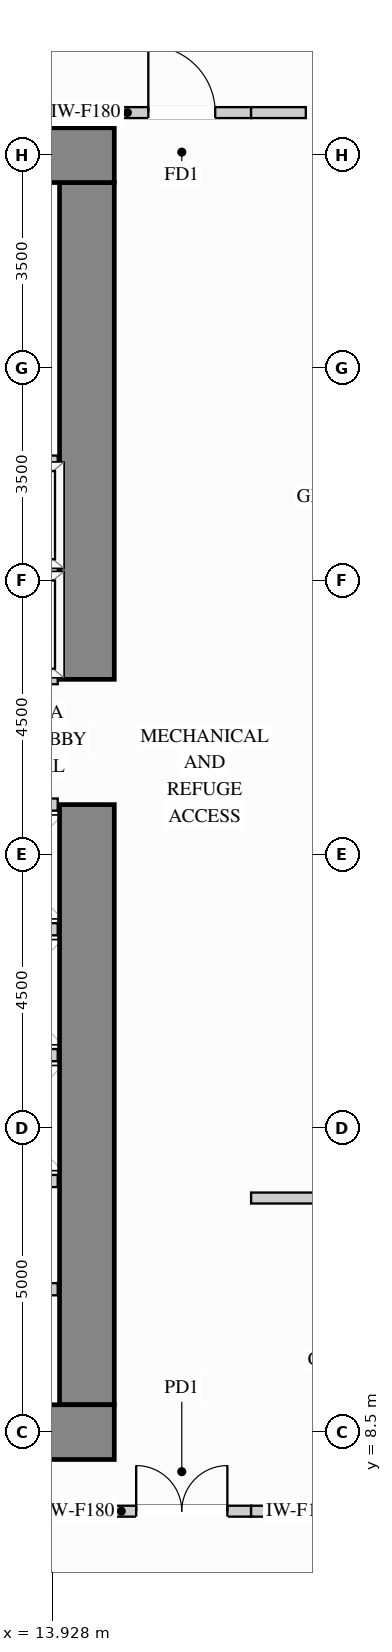
"""IFC4 building model, lengths in metres.
Left out: names, types, materials, properties, quantities, classifications, styles, units other than length and angle.
Written with IfcOpenShell. Run it as: python <this file> out.ifc"""

import sys

from ifc_helpers import new_model, si_unit, direction, frame, frame_2d, origin, place, context, subcontext, project, spatial, rectangle, extrude, source, transform, mapped, element, fill, save


model = new_model("IFC4")
c1 = context("Model", 3, precision=1e-05, world=origin(), true_north=direction((0.0, 1.0)))
c2 = subcontext(c1, "Body", "Model", "MODEL_VIEW")
j1 = project(units=[si_unit("LENGTHUNIT", "METRE"), si_unit("PLANEANGLEUNIT", "RADIAN")], contexts=[c1])
p1 = place(None, origin())
s1 = spatial("IfcSite", under=j1, at=p1, CompositionType="ELEMENT")
p2 = place(p1, origin())
s2 = spatial("IfcBuilding", under=s1, at=p2, CompositionType="ELEMENT")
p3 = place(p2, frame((0.0, 0.0, 72.9)))
s3 = spatial("IfcBuildingStorey", under=s2, at=p3, CompositionType="ELEMENT", Elevation=72.9)
m1 = source(origin(), c2, "Body", "SweptSolid", [
    extrude(rectangle(XDim=9.87, YDim=0.9, at=frame_2d((4.935, 0.0))), origin(), (0.0, 0.0, 1.0), 4.26),
])
p4 = place(p3, frame((14.5, 8.95, 0.0), z_axis=(0.0, 0.0, 1.0), x_axis=(0.0, 1.0, 0.0)))
e1 = element("IfcWall", 1, at=p4, inside=s3, PredefinedType="SHEAR", context=c2, shape_type="MappedRepresentation", body=[
    mapped(m1, transform((0.0, 0.0, 0.0), x_axis=(1.0, 0.0, 0.0), y_axis=(0.0, 1.0, 0.0), z_axis=(0.0, 0.0, 1.0))),
])
m2 = source(origin(), c2, "Body", "SweptSolid", [
    extrude(rectangle(XDim=8.17, YDim=0.9, at=frame_2d((4.085, 0.0))), origin(), (0.0, 0.0, 1.0), 4.26),
])
p5 = place(p3, frame((14.5, 20.88, 0.0), z_axis=(0.0, 0.0, 1.0), x_axis=(0.0, 1.0, 0.0)))
e2 = element("IfcWall", 2, at=p5, inside=s3, PredefinedType="SHEAR", context=c2, shape_type="MappedRepresentation", body=[
    mapped(m2, transform((0.0, 0.0, 0.0), x_axis=(1.0, 0.0, 0.0), y_axis=(0.0, 1.0, 0.0), z_axis=(0.0, 0.0, 1.0))),
])
m3 = source(origin(), c2, "Body", "SweptSolid", [
    extrude(rectangle(XDim=10.9, YDim=0.9, at=frame_2d((5.45, 0.0))), origin(), (0.0, 0.0, 1.0), 4.26),
])
for number, where, z_axis, x_axis in (
    (3, (4.05, 29.5, 0.0), (0.0, 0.0, 1.0), (1.0, 0.0, 0.0)),
    (4, (4.05, 8.5, 0.0), (0.0, 0.0, 1.0), (1.0, 0.0, 0.0)),
):
    element("IfcWall", number, at=place(p3, frame(where, z_axis=z_axis, x_axis=x_axis)), inside=s3, PredefinedType="SHEAR", context=c2, shape_type="MappedRepresentation", body=[
        mapped(m3, transform((0.0, 0.0, 0.0), x_axis=(1.0, 0.0, 0.0), y_axis=(0.0, 1.0, 0.0), z_axis=(0.0, 0.0, 1.0))),
    ])
p6 = place(p3, frame((14.92, 7.2, 0.0), z_axis=(0.0, 0.0, 1.0), x_axis=(1.0, 0.0, 0.0)))
e5 = element("IfcWall", 5, at=p6, inside=s3, PredefinedType="PARTITIONING", context=c2, shape_type="SweptSolid", body=[
    extrude(rectangle(XDim=2.28, YDim=0.18, at=frame_2d((1.14, 0.0))), origin(), (0.0, 0.0, 1.0), 4.245),
])
p7 = place(p6, frame((0.39, 0.0, 0.0)))
e6 = element("IfcOpeningElement", 6, at=p7, cuts=e5, PredefinedType="OPENING", context=c2, shape_type="SweptSolid", body=[
    extrude(rectangle(XDim=1.5, YDim=2.2, at=frame_2d((0.75, 1.1))), frame((0.0, 0.1, 0.0), z_axis=(0.0, -1.0, 0.0), x_axis=(1.0, 0.0, 0.0)), (0.0, 0.0, 1.0), 0.2),
])
m4 = source(origin(), c2, "Body", "SweptSolid", [
    extrude(rectangle(XDim=13.42, YDim=0.18, at=frame_2d((6.71, 0.0))), origin(), (0.0, 0.0, 1.0), 4.245),
])
p8 = place(p3, frame((1.5, 7.2, 0.0), z_axis=(0.0, 0.0, 1.0), x_axis=(1.0, 0.0, 0.0)))
e7 = element("IfcWall", 7, at=p8, inside=s3, PredefinedType="PARTITIONING", context=c2, shape_type="MappedRepresentation", body=[
    mapped(m4, transform((0.0, 0.0, 0.0), x_axis=(1.0, 0.0, 0.0), y_axis=(0.0, 1.0, 0.0), z_axis=(0.0, 0.0, 1.0))),
])
m5 = source(origin(), c2, "Body", "SweptSolid", [
    extrude(rectangle(XDim=0.9, YDim=0.18, at=frame_2d((0.45, 0.0))), origin(), (0.0, 0.0, 1.0), 4.245),
])
p9 = place(p3, frame((17.2, 7.2, 0.0), z_axis=(0.0, 0.0, 1.0), x_axis=(1.0, 0.0, 0.0)))
e8 = element("IfcWall", 8, at=p9, inside=s3, PredefinedType="PARTITIONING", context=c2, shape_type="MappedRepresentation", body=[
    mapped(m5, transform((0.0, 0.0, 0.0), x_axis=(1.0, 0.0, 0.0), y_axis=(0.0, 1.0, 0.0), z_axis=(0.0, 0.0, 1.0))),
])
p10 = place(p3, frame((14.92, 30.2, 0.0), z_axis=(0.0, 0.0, 1.0), x_axis=(1.0, 0.0, 0.0)))
e9 = element("IfcWall", 9, at=p10, inside=s3, PredefinedType="PARTITIONING", context=c2, shape_type="SweptSolid", body=[
    extrude(rectangle(XDim=2.28, YDim=0.18, at=frame_2d((1.14, 0.0))), origin(), (0.0, 0.0, 1.0), 4.245),
])
p11 = place(p10, frame((0.59, 0.0, 0.0)))
e10 = element("IfcOpeningElement", 10, at=p11, cuts=e9, PredefinedType="OPENING", context=c2, shape_type="SweptSolid", body=[
    extrude(rectangle(XDim=1.1, YDim=2.15, at=frame_2d((0.55, 1.075))), frame((0.0, 0.1, 0.0), z_axis=(0.0, -1.0, 0.0), x_axis=(1.0, 0.0, 0.0)), (0.0, 0.0, 1.0), 0.2),
])
p12 = place(p3, frame((1.5, 30.2, 0.0), z_axis=(0.0, 0.0, 1.0), x_axis=(1.0, 0.0, 0.0)))
e11 = element("IfcWall", 11, at=p12, inside=s3, PredefinedType="PARTITIONING", context=c2, shape_type="MappedRepresentation", body=[
    mapped(m4, transform((0.0, 0.0, 0.0), x_axis=(1.0, 0.0, 0.0), y_axis=(0.0, 1.0, 0.0), z_axis=(0.0, 0.0, 1.0))),
])
p13 = place(p3, frame((17.2, 30.2, 0.0), z_axis=(0.0, 0.0, 1.0), x_axis=(1.0, 0.0, 0.0)))
e12 = element("IfcWall", 12, at=p13, inside=s3, PredefinedType="PARTITIONING", context=c2, shape_type="MappedRepresentation", body=[
    mapped(m5, transform((0.0, 0.0, 0.0), x_axis=(1.0, 0.0, 0.0), y_axis=(0.0, 1.0, 0.0), z_axis=(0.0, 0.0, 1.0))),
])
m6 = source(origin(), c2, "Body", "SweptSolid", [
    extrude(rectangle(XDim=6.85, YDim=0.18, at=frame_2d((3.425, 0.0))), origin(), (0.0, 0.0, 1.0), 4.245),
])
p14 = place(p3, frame((17.2, 12.35, 0.0), z_axis=(0.0, 0.0, 1.0), x_axis=(1.0, 0.0, 0.0)))
e13 = element("IfcWall", 13, at=p14, inside=s3, PredefinedType="PARTITIONING", context=c2, shape_type="MappedRepresentation", body=[
    mapped(m6, transform((0.0, 0.0, 0.0), x_axis=(1.0, 0.0, 0.0), y_axis=(0.0, 1.0, 0.0), z_axis=(0.0, 0.0, 1.0))),
])
m7 = source(origin(), c2, "Body", "SweptSolid", [
    extrude(rectangle(XDim=1.6, YDim=0.2, at=frame_2d((0.8, 0.0))), origin(), (0.0, 0.0, 1.0), 4.245),
])
p15 = place(p3, frame((12.42, 10.85, 0.0), z_axis=(0.0, 0.0, 1.0), x_axis=(1.0, 0.0, 0.0)))
e14 = element("IfcWall", 14, at=p15, inside=s3, PredefinedType="PARTITIONING", context=c2, shape_type="MappedRepresentation", body=[
    mapped(m7, transform((0.0, 0.0, 0.0), x_axis=(1.0, 0.0, 0.0), y_axis=(0.0, 1.0, 0.0), z_axis=(0.0, 0.0, 1.0))),
])
m8 = source(origin(), c2, "Body", "SweptSolid", [
    extrude(rectangle(XDim=2.19, YDim=0.2, at=frame_2d((1.095, 0.0))), origin(), (0.0, 0.0, 1.0), 4.245),
])
for number, where, z_axis, x_axis in (
    (15, (11.83, 22.66, 0.0), (0.0, 0.0, 1.0), (1.0, 0.0, 0.0)),
    (16, (11.83, 20.9, 0.0), (0.0, 0.0, 1.0), (1.0, 0.0, 0.0)),
    (17, (11.83, 24.46, 0.0), (0.0, 0.0, 1.0), (1.0, 0.0, 0.0)),
):
    element("IfcWall", number, at=place(p3, frame(where, z_axis=z_axis, x_axis=x_axis)), inside=s3, PredefinedType="PARTITIONING", context=c2, shape_type="MappedRepresentation", body=[
        mapped(m8, transform((0.0, 0.0, 0.0), x_axis=(1.0, 0.0, 0.0), y_axis=(0.0, 1.0, 0.0), z_axis=(0.0, 0.0, 1.0))),
    ])
m9 = source(origin(), c2, "Body", "SweptSolid", [
    extrude(rectangle(XDim=1.79, YDim=0.2, at=frame_2d((0.895, 0.0))), origin(), (0.0, 0.0, 1.0), 4.245),
])
for number, where, z_axis, x_axis in (
    (18, (12.23, 14.7, 0.0), (0.0, 0.0, 1.0), (1.0, 0.0, 0.0)),
    (19, (12.23, 12.63, 0.0), (0.0, 0.0, 1.0), (1.0, 0.0, 0.0)),
    (20, (12.23, 16.77, 0.0), (0.0, 0.0, 1.0), (1.0, 0.0, 0.0)),
    (21, (12.23, 18.82, 0.0), (0.0, 0.0, 1.0), (1.0, 0.0, 0.0)),
):
    element("IfcWall", number, at=place(p3, frame(where, z_axis=z_axis, x_axis=x_axis)), inside=s3, PredefinedType="PARTITIONING", context=c2, shape_type="MappedRepresentation", body=[
        mapped(m9, transform((0.0, 0.0, 0.0), x_axis=(1.0, 0.0, 0.0), y_axis=(0.0, 1.0, 0.0), z_axis=(0.0, 0.0, 1.0))),
    ])
m10 = source(origin(), c2, "Body", "SweptSolid", [
    extrude(rectangle(XDim=1.1, YDim=2.15, at=frame_2d((0.55, 1.075))), frame((0.0, 0.025, 0.0), z_axis=(0.0, -1.0, 0.0), x_axis=(1.0, 0.0, 0.0)), (0.0, 0.0, 1.0), 0.05),
])
p16 = place(p11, origin())
e22 = element("IfcDoor", 22, at=p16, inside=s3, OperationType="SINGLE_SWING_LEFT", PredefinedType="DOOR", context=c2, shape_type="MappedRepresentation", body=[
    mapped(m10, transform((0.0, 0.0, 0.0), x_axis=(1.0, 0.0, 0.0), y_axis=(0.0, 1.0, 0.0), z_axis=(0.0, 0.0, 1.0))),
])
fill(e10, e22)
m11 = source(origin(), c2, "Body", "SweptSolid", [
    extrude(rectangle(XDim=1.5, YDim=2.2, at=frame_2d((0.75, 1.1))), frame((0.0, 0.025, 0.0), z_axis=(0.0, -1.0, 0.0), x_axis=(1.0, 0.0, 0.0)), (0.0, 0.0, 1.0), 0.05),
])
p17 = place(p7, origin())
e23 = element("IfcDoor", 23, at=p17, inside=s3, OperationType="DOUBLE_DOOR_SINGLE_SWING", PredefinedType="DOOR", context=c2, shape_type="MappedRepresentation", body=[
    mapped(m11, transform((0.0, 0.0, 0.0), x_axis=(1.0, 0.0, 0.0), y_axis=(0.0, 1.0, 0.0), z_axis=(0.0, 0.0, 1.0))),
])
fill(e6, e23)
save(model, sys.argv[1])
